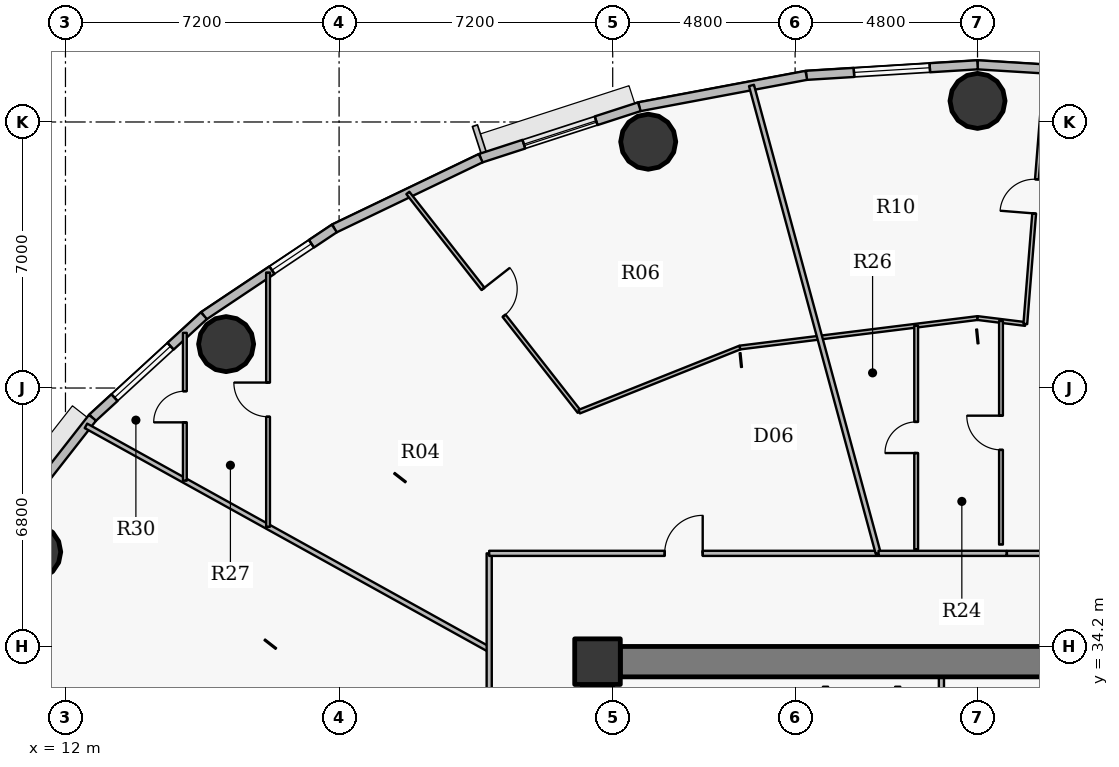
"""IFC4 building model, lengths in metres.
Left out: names, types, materials, properties, quantities, classifications, styles, units other than length and angle.
Written with IfcOpenShell. Run it as: python <this file> out.ifc"""

import sys

from ifc_helpers import new_model, si_unit, direction, frame, frame_2d, origin, origin_2d, place, context, subcontext, project, spatial, rectangle, hollow_circle, extrude, source, transform, mapped, element, fill, save


model = new_model("IFC4")
c1 = context("Model", 3, precision=1e-05, world=origin(), true_north=direction((0.0, 1.0)))
c2 = subcontext(c1, "Body", "Model", "MODEL_VIEW")
j1 = project(units=[si_unit("LENGTHUNIT", "METRE"), si_unit("PLANEANGLEUNIT", "RADIAN")], contexts=[c1])
p1 = place(None, origin())
s1 = spatial("IfcSite", under=j1, at=p1, CompositionType="ELEMENT")
p2 = place(p1, origin())
s2 = spatial("IfcBuilding", under=s1, at=p2, CompositionType="ELEMENT")
p3 = place(p2, frame((0.0, 0.0, 134.7)))
s3 = spatial("IfcBuildingStorey", under=s2, at=p3, CompositionType="ELEMENT", Elevation=134.7)
p4 = place(p3, frame((26.0, 33.8, 0.0), z_axis=(0.0, 0.0, 1.0), x_axis=(1.0, 0.0, 0.0)))
e1 = element("IfcColumn", 1, at=p4, inside=s3, PredefinedType="COLUMN", context=c2, shape_type="SweptSolid", body=[
    extrude(rectangle(XDim=1.2, YDim=1.2, at=origin_2d()), origin(), (0.0, 0.0, 1.0), 3.75),
])
p5 = place(p3, frame((26.6, 33.8, 0.0), z_axis=(0.0, 0.0, 1.0), x_axis=(1.0, 0.0, 0.0)))
e2 = element("IfcWall", 2, at=p5, inside=s3, PredefinedType="SHEAR", context=c2, shape_type="SweptSolid", body=[
    extrude(rectangle(XDim=18.8, YDim=0.8, at=frame_2d((9.4, 0.0))), origin(), (0.0, 0.0, 1.0), 2.95),
])
p6 = place(p3, frame((26.0, 20.8, 0.0), z_axis=(0.0, 0.0, 1.0), x_axis=(0.0, 1.0, 0.0)))
e3 = element("IfcWall", 3, at=p6, inside=s3, PredefinedType="SHEAR", context=c2, shape_type="SweptSolid", body=[
    extrude(rectangle(XDim=12.4, YDim=0.8, at=frame_2d((6.2, 0.0))), origin(), (0.0, 0.0, 1.0), 2.95),
])
p7 = place(p6, frame((5.79, 0.0, 0.0)))
e4 = element("IfcOpeningElement", 4, at=p7, cuts=e3, PredefinedType="OPENING", context=c2, shape_type="SweptSolid", body=[
    extrude(rectangle(XDim=0.82, YDim=2.1, at=origin_2d()), frame((0.41, 0.41, 1.05), z_axis=(0.0, -1.0, 0.0), x_axis=(1.0, 0.0, 0.0)), (0.0, 0.0, 1.0), 0.82),
])
for number, where, z_axis, x_axis in (
    (5, (36.0, 48.555, 0.0), (0.0, 0.0, 1.0), (1.0, 0.0, 0.0)),
    (6, (27.334, 47.481, 0.0), (0.0, 0.0, 1.0), (1.0, 0.0, 0.0)),
    (7, (16.227, 42.156, 0.0), (0.0, 0.0, 1.0), (1.0, 0.0, 0.0)),
    (8, (11.151, 36.688, 0.0), (0.0, 0.0, 1.0), (1.0, 0.0, 0.0)),
):
    element("IfcColumn", number, at=place(p3, frame(where, z_axis=z_axis, x_axis=x_axis)), inside=s3, PredefinedType="COLUMN", context=c2, shape_type="SweptSolid", body=[
        extrude(hollow_circle(Radius=0.725, WallThickness=0.042, at=origin_2d()), origin(), (0.0, 0.0, 1.0), 3.75),
    ])
p8 = place(p3, frame((36.0, 49.505, 0.0), z_axis=(0.0, 0.0, 1.0), x_axis=(0.998107531589, -0.061492726276, 0.0)))
e9 = element("IfcWall", 9, at=p8, inside=s3, PredefinedType="SOLIDWALL", context=c2, shape_type="SweptSolid", body=[
    extrude(rectangle(XDim=4.514, YDim=0.24, at=frame_2d((2.257, 0.0))), origin(), (0.0, 0.0, 1.0), 3.5),
])
p9 = place(p8, frame((2.161, 0.0, 0.9)))
e10 = element("IfcOpeningElement", 10, at=p9, cuts=e9, PredefinedType="OPENING", context=c2, shape_type="SweptSolid", body=[
    extrude(rectangle(XDim=1.6, YDim=1.75, at=origin_2d()), frame((0.8, 0.13, 0.875), z_axis=(0.0, -1.0, 0.0), x_axis=(1.0, 0.0, 0.0)), (0.0, 0.0, 1.0), 0.26),
])
p10 = place(p3, frame((31.494, 49.227, 0.0), z_axis=(0.0, 0.0, 1.0), x_axis=(0.998107531589, 0.061492726276, 0.0)))
e11 = element("IfcWall", 11, at=p10, inside=s3, PredefinedType="SOLIDWALL", context=c2, shape_type="SweptSolid", body=[
    extrude(rectangle(XDim=4.514, YDim=0.24, at=frame_2d((2.257, 0.0))), origin(), (0.0, 0.0, 1.0), 3.5),
])
p11 = place(p10, frame((1.257, 0.0, 0.9)))
e12 = element("IfcOpeningElement", 12, at=p11, cuts=e11, PredefinedType="OPENING", context=c2, shape_type="SweptSolid", body=[
    extrude(rectangle(XDim=2.0, YDim=1.75, at=origin_2d()), frame((1.0, 0.13, 0.875), z_axis=(0.0, -1.0, 0.0), x_axis=(1.0, 0.0, 0.0)), (0.0, 0.0, 1.0), 0.26),
])
p12 = place(p3, frame((27.1, 48.401, 0.0), z_axis=(0.0, 0.0, 1.0), x_axis=(0.982789252177, 0.184730305596, 0.0)))
e13 = element("IfcWall", 13, at=p12, inside=s3, PredefinedType="SOLIDWALL", context=c2, shape_type="SweptSolid", body=[
    extrude(rectangle(XDim=4.471, YDim=0.24, at=frame_2d((2.235, 0.0))), origin(), (0.0, 0.0, 1.0), 3.5),
])
p13 = place(p3, frame((22.926, 47.047, 0.0), z_axis=(0.0, 0.0, 1.0), x_axis=(0.951211346073, 0.308540070495, 0.0)))
e14 = element("IfcWall", 14, at=p13, inside=s3, PredefinedType="SOLIDWALL", context=c2, shape_type="SweptSolid", body=[
    extrude(rectangle(XDim=4.388, YDim=0.24, at=frame_2d((2.194, 0.0))), origin(), (0.0, 0.0, 1.0), 3.5),
])
p14 = place(p13, frame((1.194, 0.0, 0.9)))
e15 = element("IfcOpeningElement", 15, at=p14, cuts=e14, PredefinedType="OPENING", context=c2, shape_type="SweptSolid", body=[
    extrude(rectangle(XDim=2.0, YDim=1.75, at=origin_2d()), frame((1.0, 0.13, 0.875), z_axis=(0.0, -1.0, 0.0), x_axis=(1.0, 0.0, 0.0)), (0.0, 0.0, 1.0), 0.26),
])
p15 = place(p3, frame((19.075, 45.199, 0.0), z_axis=(0.0, 0.0, 1.0), x_axis=(0.901589935876, 0.432591709962, 0.0)))
e16 = element("IfcWall", 16, at=p15, inside=s3, PredefinedType="SOLIDWALL", context=c2, shape_type="SweptSolid", body=[
    extrude(rectangle(XDim=4.272, YDim=0.24, at=frame_2d((2.136, 0.0))), origin(), (0.0, 0.0, 1.0), 3.5),
])
p16 = place(p3, frame((15.642, 42.903, 0.0), z_axis=(0.0, 0.0, 1.0), x_axis=(0.831221811447, 0.555940914284, 0.0)))
e17 = element("IfcWall", 17, at=p16, inside=s3, PredefinedType="SOLIDWALL", context=c2, shape_type="SweptSolid", body=[
    extrude(rectangle(XDim=4.13, YDim=0.24, at=frame_2d((2.065, 0.0))), origin(), (0.0, 0.0, 1.0), 3.5),
])
p17 = place(p16, frame((2.156, 0.0, 0.9)))
e18 = element("IfcOpeningElement", 18, at=p17, cuts=e17, PredefinedType="OPENING", context=c2, shape_type="SweptSolid", body=[
    extrude(rectangle(XDim=1.25, YDim=1.65, at=origin_2d()), frame((0.625, 0.13, 0.825), z_axis=(0.0, -1.0, 0.0), x_axis=(1.0, 0.0, 0.0)), (0.0, 0.0, 1.0), 0.26),
])
p18 = place(p3, frame((12.711, 40.217, 0.0), z_axis=(0.0, 0.0, 1.0), x_axis=(0.737113356241, 0.675769117414, 0.0)))
e19 = element("IfcWall", 19, at=p18, inside=s3, PredefinedType="SOLIDWALL", context=c2, shape_type="SweptSolid", body=[
    extrude(rectangle(XDim=3.976, YDim=0.24, at=frame_2d((1.988, 0.0))), origin(), (0.0, 0.0, 1.0), 3.5),
])
p19 = place(p18, frame((0.787, 0.0, 0.9)))
e20 = element("IfcOpeningElement", 20, at=p19, cuts=e19, PredefinedType="OPENING", context=c2, shape_type="SweptSolid", body=[
    extrude(rectangle(XDim=2.0, YDim=1.75, at=origin_2d()), frame((1.0, 0.13, 0.875), z_axis=(0.0, -1.0, 0.0), x_axis=(1.0, 0.0, 0.0)), (0.0, 0.0, 1.0), 0.26),
])
p20 = place(p3, frame((10.355, 37.206, 0.0), z_axis=(0.0, 0.0, 1.0), x_axis=(0.616272103517, 0.787533297345, 0.0)))
e21 = element("IfcWall", 21, at=p20, inside=s3, PredefinedType="SOLIDWALL", context=c2, shape_type="SweptSolid", body=[
    extrude(rectangle(XDim=3.823, YDim=0.24, at=frame_2d((1.912, 0.0))), origin(), (0.0, 0.0, 1.0), 3.5),
])
p21 = place(p3, frame((12.539, 40.005, 0.0), z_axis=(0.0, 0.0, 1.0), x_axis=(0.874619146564, -0.484810631549, 0.0)))
e22 = element("IfcWall", 22, at=p21, inside=s3, PredefinedType="PARTITIONING", context=c2, shape_type="SweptSolid", body=[
    extrude(rectangle(XDim=12.132, YDim=0.135, at=frame_2d((6.066, 0.0))), origin(), (0.0, 0.0, 1.0), 2.935),
])
p22 = place(p3, frame((15.142, 38.562, 0.0), z_axis=(0.0, 0.0, 1.0), x_axis=(0.0, 1.0, 0.0)))
e23 = element("IfcWall", 23, at=p22, inside=s3, PredefinedType="PARTITIONING", context=c2, shape_type="SweptSolid", body=[
    extrude(rectangle(XDim=3.89, YDim=0.1, at=frame_2d((1.945, 0.0))), origin(), (0.0, 0.0, 1.0), 2.935),
])
p23 = place(p22, frame((1.535, 0.0, 0.0)))
e24 = element("IfcOpeningElement", 24, at=p23, cuts=e23, PredefinedType="OPENING", context=c2, shape_type="SweptSolid", body=[
    extrude(rectangle(XDim=0.82, YDim=2.1, at=origin_2d()), frame((0.41, 0.06, 1.05), z_axis=(0.0, -1.0, 0.0), x_axis=(1.0, 0.0, 0.0)), (0.0, 0.0, 1.0), 0.12),
])
p24 = place(p3, frame((17.331, 37.348, 0.0), z_axis=(0.0, 0.0, 1.0), x_axis=(0.0, 1.0, 0.0)))
e25 = element("IfcWall", 25, at=p24, inside=s3, PredefinedType="PARTITIONING", context=c2, shape_type="SweptSolid", body=[
    extrude(rectangle(XDim=6.691, YDim=0.1, at=frame_2d((3.345, 0.0))), origin(), (0.0, 0.0, 1.0), 2.935),
])
p25 = place(p24, frame((2.895, 0.0, 0.0)))
e26 = element("IfcOpeningElement", 26, at=p25, cuts=e25, PredefinedType="OPENING", context=c2, shape_type="SweptSolid", body=[
    extrude(rectangle(XDim=0.9, YDim=2.1, at=origin_2d()), frame((0.45, 0.06, 1.05), z_axis=(0.0, -1.0, 0.0), x_axis=(1.0, 0.0, 0.0)), (0.0, 0.0, 1.0), 0.12),
])
p26 = place(p3, frame((21.01, 46.133, 0.0), z_axis=(0.0, 0.0, 1.0), x_axis=(0.616738538538, -0.787168072956, 0.0)))
e27 = element("IfcWall", 27, at=p26, inside=s3, PredefinedType="PARTITIONING", context=c2, shape_type="SweptSolid", body=[
    extrude(rectangle(XDim=7.312, YDim=0.1, at=frame_2d((3.656, 0.0))), origin(), (0.0, 0.0, 1.0), 2.935),
])
p27 = place(p26, frame((3.206, 0.0, 0.0)))
e28 = element("IfcOpeningElement", 28, at=p27, cuts=e27, PredefinedType="OPENING", context=c2, shape_type="SweptSolid", body=[
    extrude(rectangle(XDim=0.9, YDim=2.1, at=origin_2d()), frame((0.45, 0.06, 1.05), z_axis=(0.0, -1.0, 0.0), x_axis=(1.0, 0.0, 0.0)), (0.0, 0.0, 1.0), 0.12),
])
p28 = place(p3, frame((23.15, 17.35, 0.0), z_axis=(0.0, 0.0, 1.0), x_axis=(0.0, 1.0, 0.0)))
e29 = element("IfcWall", 29, at=p28, inside=s3, PredefinedType="PARTITIONING", context=c2, shape_type="SweptSolid", body=[
    extrude(rectangle(XDim=19.3, YDim=0.135, at=frame_2d((9.65, 0.0))), origin(), (0.0, 0.0, 1.0), 2.935),
])
p29 = place(p28, frame((11.733, 0.0, 0.0)))
e30 = element("IfcOpeningElement", 30, at=p29, cuts=e29, PredefinedType="OPENING", context=c2, shape_type="SweptSolid", body=[
    extrude(rectangle(XDim=1.05, YDim=2.15, at=origin_2d()), frame((0.525, 0.078, 1.075), z_axis=(0.0, -1.0, 0.0), x_axis=(1.0, 0.0, 0.0)), (0.0, 0.0, 1.0), 0.155),
])
p30 = place(p28, frame((6.074, 0.0, 0.0)))
e31 = element("IfcOpeningElement", 31, at=p30, cuts=e29, PredefinedType="OPENING", context=c2, shape_type="SweptSolid", body=[
    extrude(rectangle(XDim=0.82, YDim=2.1, at=origin_2d()), frame((0.41, 0.078, 1.05), z_axis=(0.0, -1.0, 0.0), x_axis=(1.0, 0.0, 0.0)), (0.0, 0.0, 1.0), 0.155),
])
p31 = place(p3, frame((23.15, 36.65, 0.0), z_axis=(0.0, 0.0, 1.0), x_axis=(1.0, 0.0, 0.0)))
e32 = element("IfcWall", 32, at=p31, inside=s3, PredefinedType="PARTITIONING", context=c2, shape_type="SweptSolid", body=[
    extrude(rectangle(XDim=10.236, YDim=0.135, at=frame_2d((5.118, 0.0))), origin(), (0.0, 0.0, 1.0), 2.935),
])
p32 = place(p31, frame((4.618, 0.0, 0.0)))
e33 = element("IfcOpeningElement", 33, at=p32, cuts=e32, PredefinedType="OPENING", context=c2, shape_type="SweptSolid", body=[
    extrude(rectangle(XDim=1.0, YDim=2.15, at=origin_2d()), frame((0.5, 0.078, 1.075), z_axis=(0.0, -1.0, 0.0), x_axis=(1.0, 0.0, 0.0)), (0.0, 0.0, 1.0), 0.155),
])
p33 = place(p3, frame((25.519, 40.378, 0.0), z_axis=(0.0, 0.0, 1.0), x_axis=(0.928790623107, 0.37060488182, 0.0)))
e34 = element("IfcWall", 34, at=p33, inside=s3, PredefinedType="PARTITIONING", context=c2, shape_type="SweptSolid", body=[
    extrude(rectangle(XDim=4.554, YDim=0.1, at=frame_2d((2.277, 0.0))), origin(), (0.0, 0.0, 1.0), 2.935),
])
p34 = place(p3, frame((29.749, 42.066, 0.0), z_axis=(0.0, 0.0, 1.0), x_axis=(0.992395485088, 0.123090215599, 0.0)))
e35 = element("IfcWall", 35, at=p34, inside=s3, PredefinedType="PARTITIONING", context=c2, shape_type="SweptSolid", body=[
    extrude(rectangle(XDim=6.299, YDim=0.1, at=frame_2d((3.15, 0.0))), origin(), (0.0, 0.0, 1.0), 2.935),
])
p35 = place(p3, frame((30.052, 48.961, 0.0), z_axis=(0.0, 0.0, 1.0), x_axis=(0.261432565902, -0.965221743169, 0.0)))
e36 = element("IfcWall", 36, at=p35, inside=s3, PredefinedType="PARTITIONING", context=c2, shape_type="SweptSolid", body=[
    extrude(rectangle(XDim=12.755, YDim=0.135, at=frame_2d((6.377, 0.0))), origin(), (0.0, 0.0, 1.0), 2.935),
])
p36 = place(p3, frame((34.385, 36.757, 0.0), z_axis=(0.0, 0.0, 1.0), x_axis=(0.0, 1.0, 0.0)))
e37 = element("IfcWall", 37, at=p36, inside=s3, PredefinedType="PARTITIONING", context=c2, shape_type="SweptSolid", body=[
    extrude(rectangle(XDim=5.884, YDim=0.1, at=frame_2d((2.942, 0.0))), origin(), (0.0, 0.0, 1.0), 3.185),
])
p37 = place(p36, frame((2.532, 0.0, 0.0)))
e38 = element("IfcOpeningElement", 38, at=p37, cuts=e37, PredefinedType="OPENING", context=c2, shape_type="SweptSolid", body=[
    extrude(rectangle(XDim=0.82, YDim=2.1, at=origin_2d()), frame((0.41, 0.06, 1.05), z_axis=(0.0, -1.0, 0.0), x_axis=(1.0, 0.0, 0.0)), (0.0, 0.0, 1.0), 0.12),
])
p38 = place(p3, frame((35.05, 31.05, 0.0), z_axis=(0.0, 0.0, 1.0), x_axis=(0.0, 1.0, 0.0)))
e39 = element("IfcWall", 39, at=p38, inside=s3, PredefinedType="PARTITIONING", context=c2, shape_type="SweptSolid", body=[
    extrude(rectangle(XDim=2.35, YDim=0.135, at=frame_2d((1.175, 0.0))), origin(), (0.0, 0.0, 1.0), 3.085),
])
p39 = place(p38, frame((0.625, 0.0, 0.0)))
e40 = element("IfcOpeningElement", 40, at=p39, cuts=e39, PredefinedType="OPENING", context=c2, shape_type="SweptSolid", body=[
    extrude(rectangle(XDim=1.1, YDim=2.15, at=origin_2d()), frame((0.55, 0.078, 1.075), z_axis=(0.0, -1.0, 0.0), x_axis=(1.0, 0.0, 0.0)), (0.0, 0.0, 1.0), 0.155),
])
p40 = place(p3, frame((36.0, 42.841, 0.0), z_axis=(0.0, 0.0, 1.0), x_axis=(0.992384274499, -0.123180565541, 0.0)))
e41 = element("IfcWall", 41, at=p40, inside=s3, PredefinedType="PARTITIONING", context=c2, shape_type="SweptSolid", body=[
    extrude(rectangle(XDim=1.267, YDim=0.1, at=frame_2d((0.633, 0.0))), origin(), (0.0, 0.0, 1.0), 2.935),
])
p41 = place(p3, frame((36.617, 36.881, 0.0), z_axis=(0.0, 0.0, 1.0), x_axis=(0.0, 1.0, 0.0)))
e42 = element("IfcWall", 42, at=p41, inside=s3, PredefinedType="PARTITIONING", context=c2, shape_type="SweptSolid", body=[
    extrude(rectangle(XDim=5.884, YDim=0.1, at=frame_2d((2.942, 0.0))), origin(), (0.0, 0.0, 1.0), 3.5),
])
p42 = place(p41, frame((2.492, 0.0, 0.0)))
e43 = element("IfcOpeningElement", 43, at=p42, cuts=e42, PredefinedType="OPENING", context=c2, shape_type="SweptSolid", body=[
    extrude(rectangle(XDim=0.9, YDim=2.1, at=origin_2d()), frame((0.45, 0.06, 1.05), z_axis=(0.0, -1.0, 0.0), x_axis=(1.0, 0.0, 0.0)), (0.0, 0.0, 1.0), 0.12),
])
p43 = place(p3, frame((36.774, 36.65, 0.0), z_axis=(0.0, 0.0, 1.0), x_axis=(1.0, 0.0, 0.0)))
e44 = element("IfcWall", 44, at=p43, inside=s3, PredefinedType="PARTITIONING", context=c2, shape_type="SweptSolid", body=[
    extrude(rectangle(XDim=12.076, YDim=0.135, at=frame_2d((6.038, 0.0))), origin(), (0.0, 0.0, 1.0), 2.935),
])
p44 = place(p43, frame((5.538, 0.0, 0.0)))
e45 = element("IfcOpeningElement", 45, at=p44, cuts=e44, PredefinedType="OPENING", context=c2, shape_type="SweptSolid", body=[
    extrude(rectangle(XDim=1.0, YDim=2.15, at=origin_2d()), frame((0.5, 0.078, 1.075), z_axis=(0.0, -1.0, 0.0), x_axis=(1.0, 0.0, 0.0)), (0.0, 0.0, 1.0), 0.155),
])
p45 = place(p3, frame((37.258, 42.685, 0.0), z_axis=(0.0, 0.0, 1.0), x_axis=(0.079919529762, 0.9968013186, 0.0)))
e46 = element("IfcWall", 46, at=p45, inside=s3, PredefinedType="PARTITIONING", context=c2, shape_type="SweptSolid", body=[
    extrude(rectangle(XDim=6.736, YDim=0.1, at=frame_2d((3.368, 0.0))), origin(), (0.0, 0.0, 1.0), 2.935),
])
p46 = place(p45, frame((2.918, 0.0, 0.0)))
e47 = element("IfcOpeningElement", 47, at=p46, cuts=e46, PredefinedType="OPENING", context=c2, shape_type="SweptSolid", body=[
    extrude(rectangle(XDim=0.9, YDim=2.1, at=origin_2d()), frame((0.45, 0.06, 1.05), z_axis=(0.0, -1.0, 0.0), x_axis=(1.0, 0.0, 0.0)), (0.0, 0.0, 1.0), 0.12),
])
p47 = place(p3, frame((32.0, 33.14, 0.0), z_axis=(0.0, 0.0, 1.0), x_axis=(0.0, -1.0, 0.0)))
e48 = element("IfcWall", 48, at=p47, inside=s3, PredefinedType="PARTITIONING", context=c2, shape_type="SweptSolid", body=[
    extrude(rectangle(XDim=1.03, YDim=0.135, at=frame_2d((0.515, 0.0))), origin(), (0.0, 0.0, 1.0), 3.035),
])
p48 = place(p3, frame((33.9, 32.11, 0.0), z_axis=(0.0, 0.0, 1.0), x_axis=(0.0, 1.0, 0.0)))
e49 = element("IfcWall", 49, at=p48, inside=s3, PredefinedType="PARTITIONING", context=c2, shape_type="SweptSolid", body=[
    extrude(rectangle(XDim=1.03, YDim=0.135, at=frame_2d((0.515, 0.0))), origin(), (0.0, 0.0, 1.0), 3.085),
])
p49 = place(p3, frame((33.396, 36.65, 0.0), z_axis=(0.0, 0.0, 1.0), x_axis=(1.0, 0.0, 0.0)))
e50 = element("IfcWall", 50, at=p49, inside=s3, PredefinedType="PARTITIONING", context=c2, shape_type="SweptSolid", body=[
    extrude(rectangle(XDim=3.367, YDim=0.135, at=frame_2d((1.684, 0.0))), origin(), (0.0, 0.0, 1.0), 2.935),
])
p50 = place(p3, frame((26.59, 34.2, 0.0), z_axis=(0.0, 0.0, 1.0), x_axis=(-1.0, 0.0, 0.0)))
e51 = element("IfcWall", 51, at=p50, inside=s3, PredefinedType="PARTITIONING", context=c2, shape_type="SweptSolid", body=[
    extrude(rectangle(XDim=0.99, YDim=0.135, at=frame_2d((0.495, 0.0))), origin(), (0.0, 0.0, 1.0), 2.935),
])
p51 = place(p3, frame((25.6, 33.893, 0.0), z_axis=(0.0, 0.0, 1.0), x_axis=(0.0, -1.0, 0.0)))
e52 = element("IfcWall", 52, at=p51, inside=s3, PredefinedType="PARTITIONING", context=c2, shape_type="SweptSolid", body=[
    extrude(rectangle(XDim=0.683, YDim=0.135, at=frame_2d((0.341, 0.0))), origin(), (0.0, 0.0, 1.0), 3.5),
])
m1 = source(origin(), c2, "Body", "SweptSolid", [
    extrude(rectangle(XDim=2.0, YDim=1.75, at=origin_2d()), frame((1.0, 0.03, 0.875), z_axis=(0.0, -1.0, 0.0), x_axis=(1.0, 0.0, 0.0)), (0.0, 0.0, 1.0), 0.06),
])
p52 = place(p11, origin())
e53 = element("IfcWindow", 53, at=p52, inside=s3, PartitioningType="DOUBLE_PANEL_VERTICAL", PredefinedType="WINDOW", context=c2, shape_type="MappedRepresentation", body=[
    mapped(m1, transform((0.0, 0.0, 0.0), x_axis=(1.0, 0.0, 0.0), y_axis=(0.0, 1.0, 0.0), z_axis=(0.0, 0.0, 1.0), scale=1.0)),
])
fill(e12, e53)
p53 = place(p14, origin())
e54 = element("IfcWindow", 54, at=p53, inside=s3, PartitioningType="DOUBLE_PANEL_VERTICAL", PredefinedType="WINDOW", context=c2, shape_type="MappedRepresentation", body=[
    mapped(m1, transform((0.0, 0.0, 0.0), x_axis=(1.0, 0.0, 0.0), y_axis=(0.0, 1.0, 0.0), z_axis=(0.0, 0.0, 1.0), scale=1.0)),
])
fill(e15, e54)
p54 = place(p19, origin())
e55 = element("IfcWindow", 55, at=p54, inside=s3, PartitioningType="DOUBLE_PANEL_VERTICAL", PredefinedType="WINDOW", context=c2, shape_type="MappedRepresentation", body=[
    mapped(m1, transform((0.0, 0.0, 0.0), x_axis=(1.0, 0.0, 0.0), y_axis=(0.0, 1.0, 0.0), z_axis=(0.0, 0.0, 1.0), scale=1.0)),
])
fill(e20, e55)
m2 = source(origin(), c2, "Body", "SweptSolid", [
    extrude(rectangle(XDim=1.25, YDim=1.65, at=origin_2d()), frame((0.625, 0.03, 0.825), z_axis=(0.0, -1.0, 0.0), x_axis=(1.0, 0.0, 0.0)), (0.0, 0.0, 1.0), 0.06),
])
p55 = place(p17, origin())
e56 = element("IfcWindow", 56, at=p55, inside=s3, PartitioningType="SINGLE_PANEL", PredefinedType="WINDOW", context=c2, shape_type="MappedRepresentation", body=[
    mapped(m2, transform((0.0, 0.0, 0.0), x_axis=(1.0, 0.0, 0.0), y_axis=(0.0, 1.0, 0.0), z_axis=(0.0, 0.0, 1.0), scale=1.0)),
])
fill(e18, e56)
m3 = source(origin(), c2, "Body", "SweptSolid", [
    extrude(rectangle(XDim=0.9, YDim=2.1, at=origin_2d()), frame((0.45, 0.025, 1.05), z_axis=(0.0, -1.0, 0.0), x_axis=(1.0, 0.0, 0.0)), (0.0, 0.0, 1.0), 0.05),
])
p56 = place(p46, origin())
e57 = element("IfcDoor", 57, at=p56, inside=s3, OperationType="SINGLE_SWING_LEFT", PredefinedType="DOOR", context=c2, shape_type="MappedRepresentation", body=[
    mapped(m3, transform((0.0, 0.0, 0.0), x_axis=(1.0, 0.0, 0.0), y_axis=(0.0, 1.0, 0.0), z_axis=(0.0, 0.0, 1.0), scale=1.0)),
])
fill(e47, e57)
p57 = place(p42, origin())
e58 = element("IfcDoor", 58, at=p57, inside=s3, OperationType="SINGLE_SWING_RIGHT", PredefinedType="DOOR", context=c2, shape_type="MappedRepresentation", body=[
    mapped(m3, transform((0.0, 0.0, 0.0), x_axis=(1.0, 0.0, 0.0), y_axis=(0.0, 1.0, 0.0), z_axis=(0.0, 0.0, 1.0), scale=1.0)),
])
fill(e43, e58)
m4 = source(origin(), c2, "Body", "SweptSolid", [
    extrude(rectangle(XDim=0.82, YDim=2.1, at=origin_2d()), frame((0.41, 0.025, 1.05), z_axis=(0.0, -1.0, 0.0), x_axis=(1.0, 0.0, 0.0)), (0.0, 0.0, 1.0), 0.05),
])
p58 = place(p37, origin())
e59 = element("IfcDoor", 59, at=p58, inside=s3, OperationType="SINGLE_SWING_LEFT", PredefinedType="DOOR", context=c2, shape_type="MappedRepresentation", body=[
    mapped(m4, transform((0.0, 0.0, 0.0), x_axis=(1.0, 0.0, 0.0), y_axis=(0.0, 1.0, 0.0), z_axis=(0.0, 0.0, 1.0), scale=1.0)),
])
fill(e38, e59)
m5 = source(origin(), c2, "Body", "SweptSolid", [
    extrude(rectangle(XDim=1.0, YDim=2.15, at=origin_2d()), frame((0.5, 0.025, 1.075), z_axis=(0.0, -1.0, 0.0), x_axis=(1.0, 0.0, 0.0)), (0.0, 0.0, 1.0), 0.05),
])
p59 = place(p32, origin())
e60 = element("IfcDoor", 60, at=p59, inside=s3, OperationType="SINGLE_SWING_RIGHT", PredefinedType="DOOR", context=c2, shape_type="MappedRepresentation", body=[
    mapped(m5, transform((0.0, 0.0, 0.0), x_axis=(1.0, 0.0, 0.0), y_axis=(0.0, 1.0, 0.0), z_axis=(0.0, 0.0, 1.0), scale=1.0)),
])
fill(e33, e60)
p60 = place(p27, origin())
e61 = element("IfcDoor", 61, at=p60, inside=s3, OperationType="SINGLE_SWING_LEFT", PredefinedType="DOOR", context=c2, shape_type="MappedRepresentation", body=[
    mapped(m3, transform((0.0, 0.0, 0.0), x_axis=(1.0, 0.0, 0.0), y_axis=(0.0, 1.0, 0.0), z_axis=(0.0, 0.0, 1.0), scale=1.0)),
])
fill(e28, e61)
p61 = place(p25, origin())
e62 = element("IfcDoor", 62, at=p61, inside=s3, OperationType="SINGLE_SWING_RIGHT", PredefinedType="DOOR", context=c2, shape_type="MappedRepresentation", body=[
    mapped(m3, transform((0.0, 0.0, 0.0), x_axis=(1.0, 0.0, 0.0), y_axis=(0.0, 1.0, 0.0), z_axis=(0.0, 0.0, 1.0), scale=1.0)),
])
fill(e26, e62)
p62 = place(p23, origin())
e63 = element("IfcDoor", 63, at=p62, inside=s3, OperationType="SINGLE_SWING_LEFT", PredefinedType="DOOR", context=c2, shape_type="MappedRepresentation", body=[
    mapped(m4, transform((0.0, 0.0, 0.0), x_axis=(1.0, 0.0, 0.0), y_axis=(0.0, 1.0, 0.0), z_axis=(0.0, 0.0, 1.0), scale=1.0)),
])
fill(e24, e63)
save(model, sys.argv[1])
